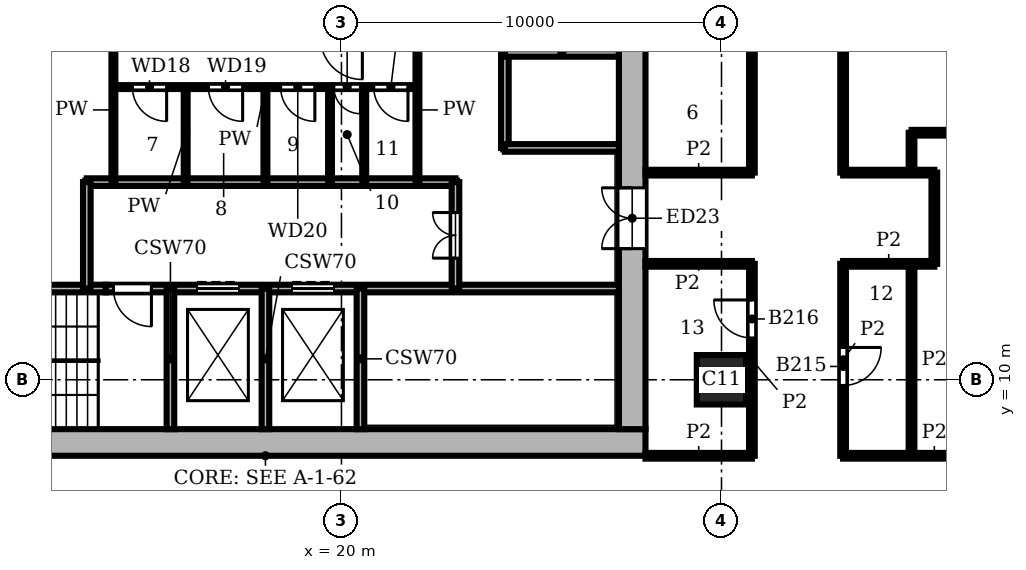
"""IFC4 building model, lengths in metres.
Left out: names, types, materials, properties, quantities, classifications, styles, units other than length and angle.
Written with IfcOpenShell. Run it as: python <this file> out.ifc"""

import sys

from ifc_helpers import new_model, si_unit, direction, frame, frame_2d, origin, origin_2d, place, context, subcontext, project, spatial, rectangle, extrude, element, fill, save


model = new_model("IFC4")
c1 = context("Model", 3, precision=1e-05, world=origin(), true_north=direction((0.0, 1.0)))
c2 = subcontext(c1, "Body", "Model", "MODEL_VIEW")
j1 = project(units=[si_unit("LENGTHUNIT", "METRE"), si_unit("PLANEANGLEUNIT", "RADIAN")], contexts=[c1])
p1 = place(None, origin())
s1 = spatial("IfcSite", under=j1, at=p1, CompositionType="ELEMENT")
p2 = place(p1, origin())
s2 = spatial("IfcBuilding", under=s1, at=p2, CompositionType="ELEMENT")
p3 = place(p2, frame((0.0, 0.0, 143.4)))
s3 = spatial("IfcBuildingStorey", under=s2, at=p3, CompositionType="ELEMENT", Elevation=143.4)
p4 = place(p3, frame((30.0, 10.0, 0.0), z_axis=(0.0, 0.0, 1.0), x_axis=(1.0, 0.0, 0.0)))
e1 = element("IfcColumn", 1, at=p4, inside=s3, PredefinedType="COLUMN", context=c2, shape_type="SweptSolid", body=[
    extrude(rectangle(XDim=1.3, YDim=1.3, at=origin_2d()), origin(), (0.0, 0.0, 1.0), 3.9),
])
p5 = place(p3, frame((8.0, 8.35, 0.0), z_axis=(0.0, 0.0, 1.0), x_axis=(1.0, 0.0, 0.0)))
e2 = element("IfcWall", 2, at=p5, inside=s3, PredefinedType="SHEAR", context=c2, shape_type="SweptSolid", body=[
    extrude(rectangle(XDim=20.0, YDim=0.7, at=frame_2d((10.0, 0.0))), origin(), (0.0, 0.0, 1.0), 3.9),
])
p6 = place(p3, frame((27.65, 8.7, 0.0), z_axis=(0.0, 0.0, 1.0), x_axis=(0.0, 1.0, 0.0)))
e3 = element("IfcWall", 3, at=p6, inside=s3, PredefinedType="SHEAR", context=c2, shape_type="SweptSolid", body=[
    extrude(rectangle(XDim=18.6, YDim=0.7, at=frame_2d((9.3, 0.0))), origin(), (0.0, 0.0, 1.0), 3.9),
])
p7 = place(p6, frame((4.75, 0.0, 0.0)))
e4 = element("IfcOpeningElement", 4, at=p7, cuts=e3, PredefinedType="OPENING", context=c2, shape_type="SweptSolid", body=[
    extrude(rectangle(XDim=1.6, YDim=2.1, at=frame_2d((0.8, 1.05))), frame((0.0, 0.36, 0.0), z_axis=(0.0, -1.0, 0.0), x_axis=(1.0, 0.0, 0.0)), (0.0, 0.0, 1.0), 0.72),
])
p8 = place(p3, frame((8.7, 12.4, 0.0), z_axis=(0.0, 0.0, 1.0), x_axis=(1.0, 0.0, 0.0)))
e5 = element("IfcWall", 5, at=p8, inside=s3, PredefinedType="SHEAR", context=c2, shape_type="SweptSolid", body=[
    extrude(rectangle(XDim=5.1, YDim=0.2, at=frame_2d((2.55, 0.0))), origin(), (0.0, 0.0, 1.0), 3.58),
])
p9 = place(p3, frame((13.8, 12.4, 0.0), z_axis=(0.0, 0.0, 1.0), x_axis=(1.0, 0.0, 0.0)))
e6 = element("IfcWall", 6, at=p9, inside=s3, PredefinedType="SHEAR", context=c2, shape_type="SweptSolid", body=[
    extrude(rectangle(XDim=13.5, YDim=0.2, at=frame_2d((6.75, 0.0))), origin(), (0.0, 0.0, 1.0), 3.58),
])
p10 = place(p9, frame((2.4, 0.0, 0.0)))
e7 = element("IfcOpeningElement", 7, at=p10, cuts=e6, PredefinedType="OPENING", context=c2, shape_type="SweptSolid", body=[
    extrude(rectangle(XDim=1.1, YDim=2.1, at=frame_2d((0.55, 1.05))), frame((0.0, 0.11, 0.0), z_axis=(0.0, -1.0, 0.0), x_axis=(1.0, 0.0, 0.0)), (0.0, 0.0, 1.0), 0.22),
])
p11 = place(p9, frame((4.9, 0.0, 0.0)))
e8 = element("IfcOpeningElement", 8, at=p11, cuts=e6, PredefinedType="OPENING", context=c2, shape_type="SweptSolid", body=[
    extrude(rectangle(XDim=1.1, YDim=2.1, at=frame_2d((0.55, 1.05))), frame((0.0, 0.11, 0.0), z_axis=(0.0, -1.0, 0.0), x_axis=(1.0, 0.0, 0.0)), (0.0, 0.0, 1.0), 0.22),
])
p12 = place(p9, frame((0.2, 0.0, 0.0)))
e9 = element("IfcOpeningElement", 9, at=p12, cuts=e6, PredefinedType="OPENING", context=c2, shape_type="SweptSolid", body=[
    extrude(rectangle(XDim=1.0, YDim=2.1, at=frame_2d((0.5, 1.05))), frame((0.0, 0.11, 0.0), z_axis=(0.0, -1.0, 0.0), x_axis=(1.0, 0.0, 0.0)), (0.0, 0.0, 1.0), 0.22),
])
p13 = place(p3, frame((13.3, 15.2, 0.0), z_axis=(0.0, 0.0, 1.0), x_axis=(1.0, 0.0, 0.0)))
e10 = element("IfcWall", 10, at=p13, inside=s3, PredefinedType="SHEAR", context=c2, shape_type="SweptSolid", body=[
    extrude(rectangle(XDim=9.7, YDim=0.2, at=frame_2d((4.85, 0.0))), origin(), (0.0, 0.0, 1.0), 3.58),
])
p14 = place(p3, frame((24.3, 16.1, 0.0), z_axis=(0.0, 0.0, 1.0), x_axis=(1.0, 0.0, 0.0)))
e11 = element("IfcWall", 11, at=p14, inside=s3, PredefinedType="SHEAR", context=c2, shape_type="SweptSolid", body=[
    extrude(rectangle(XDim=3.0, YDim=0.2, at=frame_2d((1.5, 0.0))), origin(), (0.0, 0.0, 1.0), 3.58),
])
p15 = place(p3, frame((14.0, 17.7, 0.0), z_axis=(0.0, 0.0, 1.0), x_axis=(1.0, 0.0, 0.0)))
e12 = element("IfcWall", 12, at=p15, inside=s3, PredefinedType="PARTITIONING", context=c2, shape_type="SweptSolid", body=[
    extrude(rectangle(XDim=8.0, YDim=0.1, at=frame_2d((4.0, 0.0))), origin(), (0.0, 0.0, 1.0), 3.58),
])
p16 = place(p15, frame((0.5, 0.0, 0.0)))
e13 = element("IfcOpeningElement", 13, at=p16, cuts=e12, PredefinedType="OPENING", context=c2, shape_type="SweptSolid", body=[
    extrude(rectangle(XDim=0.9, YDim=2.1, at=frame_2d((0.45, 1.05))), frame((0.0, 0.06, 0.0), z_axis=(0.0, -1.0, 0.0), x_axis=(1.0, 0.0, 0.0)), (0.0, 0.0, 1.0), 0.12),
])
p17 = place(p15, frame((2.5, 0.0, 0.0)))
e14 = element("IfcOpeningElement", 14, at=p17, cuts=e12, PredefinedType="OPENING", context=c2, shape_type="SweptSolid", body=[
    extrude(rectangle(XDim=0.9, YDim=2.1, at=frame_2d((0.45, 1.05))), frame((0.0, 0.06, 0.0), z_axis=(0.0, -1.0, 0.0), x_axis=(1.0, 0.0, 0.0)), (0.0, 0.0, 1.0), 0.12),
])
p18 = place(p15, frame((4.4, 0.0, 0.0)))
e15 = element("IfcOpeningElement", 15, at=p18, cuts=e12, PredefinedType="OPENING", context=c2, shape_type="SweptSolid", body=[
    extrude(rectangle(XDim=0.9, YDim=2.1, at=frame_2d((0.45, 1.05))), frame((0.0, 0.06, 0.0), z_axis=(0.0, -1.0, 0.0), x_axis=(1.0, 0.0, 0.0)), (0.0, 0.0, 1.0), 0.12),
])
p19 = place(p15, frame((5.8, 0.0, 0.0)))
e16 = element("IfcOpeningElement", 16, at=p19, cuts=e12, PredefinedType="OPENING", context=c2, shape_type="SweptSolid", body=[
    extrude(rectangle(XDim=0.7, YDim=2.1, at=frame_2d((0.35, 1.05))), frame((0.0, 0.06, 0.0), z_axis=(0.0, -1.0, 0.0), x_axis=(1.0, 0.0, 0.0)), (0.0, 0.0, 1.0), 0.12),
])
p20 = place(p15, frame((6.85, 0.0, 0.0)))
e17 = element("IfcOpeningElement", 17, at=p20, cuts=e12, PredefinedType="OPENING", context=c2, shape_type="SweptSolid", body=[
    extrude(rectangle(XDim=0.9, YDim=2.1, at=frame_2d((0.45, 1.05))), frame((0.0, 0.06, 0.0), z_axis=(0.0, -1.0, 0.0), x_axis=(1.0, 0.0, 0.0)), (0.0, 0.0, 1.0), 0.12),
])
p21 = place(p3, frame((24.3, 18.6, 0.0), z_axis=(0.0, 0.0, 1.0), x_axis=(1.0, 0.0, 0.0)))
e18 = element("IfcWall", 18, at=p21, inside=s3, PredefinedType="SHEAR", context=c2, shape_type="SweptSolid", body=[
    extrude(rectangle(XDim=3.0, YDim=0.2, at=frame_2d((1.5, 0.0))), origin(), (0.0, 0.0, 1.0), 3.58),
])
p22 = place(p3, frame((13.3, 12.4, 0.0), z_axis=(0.0, 0.0, 1.0), x_axis=(0.0, 1.0, 0.0)))
e19 = element("IfcWall", 19, at=p22, inside=s3, PredefinedType="SHEAR", context=c2, shape_type="SweptSolid", body=[
    extrude(rectangle(XDim=2.8, YDim=0.2, at=frame_2d((1.4, 0.0))), origin(), (0.0, 0.0, 1.0), 3.58),
])
p23 = place(p3, frame((14.0, 15.2, 0.0), z_axis=(0.0, 0.0, 1.0), x_axis=(0.0, 1.0, 0.0)))
e20 = element("IfcWall", 20, at=p23, inside=s3, PredefinedType="PARTITIONING", context=c2, shape_type="SweptSolid", body=[
    extrude(rectangle(XDim=3.8, YDim=0.1, at=frame_2d((1.9, 0.0))), origin(), (0.0, 0.0, 1.0), 3.58),
])
p24 = place(p3, frame((15.5, 8.7, 0.0), z_axis=(0.0, 0.0, 1.0), x_axis=(0.0, 1.0, 0.0)))
e21 = element("IfcWall", 21, at=p24, inside=s3, PredefinedType="SHEAR", context=c2, shape_type="SweptSolid", body=[
    extrude(rectangle(XDim=3.7, YDim=0.2, at=frame_2d((1.85, 0.0))), origin(), (0.0, 0.0, 1.0), 3.58),
])
for number, where, z_axis, x_axis in (
    (22, (15.9, 15.2, 0.0), (0.0, 0.0, 1.0), (0.0, 1.0, 0.0)),
    (23, (18.0, 15.2, 0.0), (0.0, 0.0, 1.0), (0.0, 1.0, 0.0)),
):
    element("IfcWall", number, at=place(p3, frame(where, z_axis=z_axis, x_axis=x_axis)), inside=s3, PredefinedType="PARTITIONING", context=c2, shape_type="SweptSolid", body=[
        extrude(rectangle(XDim=2.5, YDim=0.1, at=frame_2d((1.25, 0.0))), origin(), (0.0, 0.0, 1.0), 3.58),
    ])
p25 = place(p3, frame((18.0, 8.7, 0.0), z_axis=(0.0, 0.0, 1.0), x_axis=(0.0, 1.0, 0.0)))
e24 = element("IfcWall", 24, at=p25, inside=s3, PredefinedType="SHEAR", context=c2, shape_type="SweptSolid", body=[
    extrude(rectangle(XDim=3.7, YDim=0.2, at=frame_2d((1.85, 0.0))), origin(), (0.0, 0.0, 1.0), 3.58),
])
p26 = place(p3, frame((19.7, 15.2, 0.0), z_axis=(0.0, 0.0, 1.0), x_axis=(0.0, 1.0, 0.0)))
e25 = element("IfcWall", 25, at=p26, inside=s3, PredefinedType="PARTITIONING", context=c2, shape_type="SweptSolid", body=[
    extrude(rectangle(XDim=2.5, YDim=0.1, at=frame_2d((1.25, 0.0))), origin(), (0.0, 0.0, 1.0), 3.58),
])
p27 = place(p3, frame((20.5, 8.7, 0.0), z_axis=(0.0, 0.0, 1.0), x_axis=(0.0, 1.0, 0.0)))
e26 = element("IfcWall", 26, at=p27, inside=s3, PredefinedType="SHEAR", context=c2, shape_type="SweptSolid", body=[
    extrude(rectangle(XDim=3.7, YDim=0.2, at=frame_2d((1.85, 0.0))), origin(), (0.0, 0.0, 1.0), 3.58),
])
p28 = place(p3, frame((20.6, 15.2, 0.0), z_axis=(0.0, 0.0, 1.0), x_axis=(0.0, 1.0, 0.0)))
e27 = element("IfcWall", 27, at=p28, inside=s3, PredefinedType="PARTITIONING", context=c2, shape_type="SweptSolid", body=[
    extrude(rectangle(XDim=2.5, YDim=0.1, at=frame_2d((1.25, 0.0))), origin(), (0.0, 0.0, 1.0), 3.58),
])
p29 = place(p3, frame((22.0, 15.2, 0.0), z_axis=(0.0, 0.0, 1.0), x_axis=(0.0, 1.0, 0.0)))
e28 = element("IfcWall", 28, at=p29, inside=s3, PredefinedType="PARTITIONING", context=c2, shape_type="SweptSolid", body=[
    extrude(rectangle(XDim=3.8, YDim=0.1, at=frame_2d((1.9, 0.0))), origin(), (0.0, 0.0, 1.0), 3.58),
])
p30 = place(p3, frame((23.0, 12.4, 0.0), z_axis=(0.0, 0.0, 1.0), x_axis=(0.0, 1.0, 0.0)))
e29 = element("IfcWall", 29, at=p30, inside=s3, PredefinedType="SHEAR", context=c2, shape_type="SweptSolid", body=[
    extrude(rectangle(XDim=2.8, YDim=0.2, at=frame_2d((1.4, 0.0))), origin(), (0.0, 0.0, 1.0), 3.58),
])
p31 = place(p30, frame((0.8, 0.0, 0.0)))
e30 = element("IfcOpeningElement", 30, at=p31, cuts=e29, PredefinedType="OPENING", context=c2, shape_type="SweptSolid", body=[
    extrude(rectangle(XDim=1.2, YDim=2.1, at=frame_2d((0.6, 1.05))), frame((0.0, 0.11, 0.0), z_axis=(0.0, -1.0, 0.0), x_axis=(1.0, 0.0, 0.0)), (0.0, 0.0, 1.0), 0.22),
])
p32 = place(p3, frame((24.3, 16.1, 0.0), z_axis=(0.0, 0.0, 1.0), x_axis=(0.0, 1.0, 0.0)))
e31 = element("IfcWall", 31, at=p32, inside=s3, PredefinedType="SHEAR", context=c2, shape_type="SweptSolid", body=[
    extrude(rectangle(XDim=7.5, YDim=0.2, at=frame_2d((3.75, 0.0))), origin(), (0.0, 0.0, 1.0), 3.58),
])
p33 = place(p32, frame((5.7, 0.0, 0.0)))
e32 = element("IfcOpeningElement", 32, at=p33, cuts=e31, PredefinedType="OPENING", context=c2, shape_type="SweptSolid", body=[
    extrude(rectangle(XDim=1.1, YDim=2.1, at=frame_2d((0.55, 1.05))), frame((0.0, 0.11, 0.0), z_axis=(0.0, -1.0, 0.0), x_axis=(1.0, 0.0, 0.0)), (0.0, 0.0, 1.0), 0.22),
])
p34 = place(p3, frame((30.8, 8.0, 0.0), z_axis=(0.0, 0.0, 1.0), x_axis=(0.0, 1.0, 0.0)))
e33 = element("IfcWall", 33, at=p34, inside=s3, PredefinedType="PARTITIONING", context=c2, shape_type="SweptSolid", body=[
    extrude(rectangle(XDim=5.05, YDim=0.15, at=frame_2d((2.525, 0.0))), origin(), (0.0, 0.0, 1.0), 3.58),
])
p35 = place(p34, frame((3.1, 0.0, 0.0)))
e34 = element("IfcOpeningElement", 34, at=p35, cuts=e33, PredefinedType="OPENING", context=c2, shape_type="SweptSolid", body=[
    extrude(rectangle(XDim=1.0, YDim=2.1, at=frame_2d((0.5, 1.05))), frame((0.0, 0.085, 0.0), z_axis=(0.0, -1.0, 0.0), x_axis=(1.0, 0.0, 0.0)), (0.0, 0.0, 1.0), 0.17),
])
p36 = place(p3, frame((30.8, 15.451, 0.0), z_axis=(0.0, 0.0, 1.0), x_axis=(0.0, 1.0, 0.0)))
e35 = element("IfcWall", 35, at=p36, inside=s3, PredefinedType="PARTITIONING", context=c2, shape_type="SweptSolid", body=[
    extrude(rectangle(XDim=10.548, YDim=0.15, at=frame_2d((5.274, 0.0))), origin(), (0.0, 0.0, 1.0), 3.58),
])
p37 = place(p36, frame((6.85, 0.0, 0.0)))
e36 = element("IfcOpeningElement", 36, at=p37, cuts=e35, PredefinedType="OPENING", context=c2, shape_type="SweptSolid", body=[
    extrude(rectangle(XDim=1.0, YDim=2.1, at=frame_2d((0.5, 1.05))), frame((0.0, 0.085, 0.0), z_axis=(0.0, -1.0, 0.0), x_axis=(1.0, 0.0, 0.0)), (0.0, 0.0, 1.0), 0.17),
])
p38 = place(p3, frame((33.2, 8.0, 0.0), z_axis=(0.0, 0.0, 1.0), x_axis=(0.0, 1.0, 0.0)))
e37 = element("IfcWall", 37, at=p38, inside=s3, PredefinedType="PARTITIONING", context=c2, shape_type="SweptSolid", body=[
    extrude(rectangle(XDim=5.05, YDim=0.15, at=frame_2d((2.525, 0.0))), origin(), (0.0, 0.0, 1.0), 3.58),
])
p39 = place(p38, frame((1.85, 0.0, 0.0)))
e38 = element("IfcOpeningElement", 38, at=p39, cuts=e37, PredefinedType="OPENING", context=c2, shape_type="SweptSolid", body=[
    extrude(rectangle(XDim=1.0, YDim=2.1, at=frame_2d((0.5, 1.05))), frame((0.0, 0.085, 0.0), z_axis=(0.0, -1.0, 0.0), x_axis=(1.0, 0.0, 0.0)), (0.0, 0.0, 1.0), 0.17),
])
p40 = place(p3, frame((33.2, 15.451, 0.0), z_axis=(0.0, 0.0, 1.0), x_axis=(0.0, 1.0, 0.0)))
e39 = element("IfcWall", 39, at=p40, inside=s3, PredefinedType="PARTITIONING", context=c2, shape_type="SweptSolid", body=[
    extrude(rectangle(XDim=10.548, YDim=0.15, at=frame_2d((5.274, 0.0))), origin(), (0.0, 0.0, 1.0), 3.58),
])
p41 = place(p40, frame((4.85, 0.0, 0.0)))
e40 = element("IfcOpeningElement", 40, at=p41, cuts=e39, PredefinedType="OPENING", context=c2, shape_type="SweptSolid", body=[
    extrude(rectangle(XDim=1.0, YDim=2.1, at=frame_2d((0.5, 1.05))), frame((0.0, 0.085, 0.0), z_axis=(0.0, -1.0, 0.0), x_axis=(1.0, 0.0, 0.0)), (0.0, 0.0, 1.0), 0.17),
])
p42 = place(p3, frame((35.0, 8.0, 0.0), z_axis=(0.0, 0.0, 1.0), x_axis=(0.0, 1.0, 0.0)))
e41 = element("IfcWall", 41, at=p42, inside=s3, PredefinedType="PARTITIONING", context=c2, shape_type="SweptSolid", body=[
    extrude(rectangle(XDim=5.05, YDim=0.15, at=frame_2d((2.525, 0.0))), origin(), (0.0, 0.0, 1.0), 3.58),
])
p43 = place(p3, frame((35.0, 15.451, 0.0), z_axis=(0.0, 0.0, 1.0), x_axis=(0.0, 1.0, 0.0)))
e42 = element("IfcWall", 42, at=p43, inside=s3, PredefinedType="PARTITIONING", context=c2, shape_type="SweptSolid", body=[
    extrude(rectangle(XDim=1.047, YDim=0.15, at=frame_2d((0.523, 0.0))), origin(), (0.0, 0.0, 1.0), 3.58),
])
p44 = place(p3, frame((35.6, 13.05, 0.0), z_axis=(0.0, 0.0, 1.0), x_axis=(0.0, 1.0, 0.0)))
e43 = element("IfcWall", 43, at=p44, inside=s3, PredefinedType="PARTITIONING", context=c2, shape_type="SweptSolid", body=[
    extrude(rectangle(XDim=2.4, YDim=0.15, at=frame_2d((1.2, 0.0))), origin(), (0.0, 0.0, 1.0), 3.58),
])
p45 = place(p3, frame((28.0, 8.0, 0.0), z_axis=(0.0, 0.0, 1.0), x_axis=(1.0, 0.0, 0.0)))
e44 = element("IfcWall", 44, at=p45, inside=s3, PredefinedType="PARTITIONING", context=c2, shape_type="SweptSolid", body=[
    extrude(rectangle(XDim=2.8, YDim=0.15, at=frame_2d((1.4, 0.0))), origin(), (0.0, 0.0, 1.0), 3.58),
])
p46 = place(p3, frame((33.2, 8.0, 0.0), z_axis=(0.0, 0.0, 1.0), x_axis=(1.0, 0.0, 0.0)))
e45 = element("IfcWall", 45, at=p46, inside=s3, PredefinedType="PARTITIONING", context=c2, shape_type="SweptSolid", body=[
    extrude(rectangle(XDim=4.8, YDim=0.15, at=frame_2d((2.4, 0.0))), origin(), (0.0, 0.0, 1.0), 3.58),
])
p47 = place(p3, frame((28.0, 13.05, 0.0), z_axis=(0.0, 0.0, 1.0), x_axis=(1.0, 0.0, 0.0)))
e46 = element("IfcWall", 46, at=p47, inside=s3, PredefinedType="PARTITIONING", context=c2, shape_type="SweptSolid", body=[
    extrude(rectangle(XDim=2.8, YDim=0.15, at=frame_2d((1.4, 0.0))), origin(), (0.0, 0.0, 1.0), 3.58),
])
p48 = place(p3, frame((33.2, 13.05, 0.0), z_axis=(0.0, 0.0, 1.0), x_axis=(1.0, 0.0, 0.0)))
e47 = element("IfcWall", 47, at=p48, inside=s3, PredefinedType="PARTITIONING", context=c2, shape_type="SweptSolid", body=[
    extrude(rectangle(XDim=2.4, YDim=0.15, at=frame_2d((1.2, 0.0))), origin(), (0.0, 0.0, 1.0), 3.58),
])
p49 = place(p3, frame((28.0, 15.45, 0.0), z_axis=(0.0, 0.0, 1.0), x_axis=(1.0, 0.0, 0.0)))
e48 = element("IfcWall", 48, at=p49, inside=s3, PredefinedType="PARTITIONING", context=c2, shape_type="SweptSolid", body=[
    extrude(rectangle(XDim=2.799, YDim=0.15, at=frame_2d((1.399, 0.0))), origin(), (0.0, 0.0, 1.0), 3.58),
])
p50 = place(p3, frame((33.201, 15.45, 0.0), z_axis=(0.0, 0.0, 1.0), x_axis=(1.0, 0.0, 0.0)))
e49 = element("IfcWall", 49, at=p50, inside=s3, PredefinedType="PARTITIONING", context=c2, shape_type="SweptSolid", body=[
    extrude(rectangle(XDim=2.399, YDim=0.15, at=frame_2d((1.2, 0.0))), origin(), (0.0, 0.0, 1.0), 3.58),
])
p51 = place(p3, frame((35.002, 16.5, 0.0), z_axis=(0.0, 0.0, 1.0), x_axis=(1.0, 0.0, 0.0)))
e50 = element("IfcWall", 50, at=p51, inside=s3, PredefinedType="PARTITIONING", context=c2, shape_type="SweptSolid", body=[
    extrude(rectangle(XDim=19.998, YDim=0.15, at=frame_2d((9.999, 0.0))), origin(), (0.0, 0.0, 1.0), 3.58),
])
p52 = place(p10, origin())
e51 = element("IfcDoor", 51, at=p52, inside=s3, OperationType="DOUBLE_DOOR_SLIDING", PredefinedType="DOOR", context=c2, shape_type="SweptSolid", body=[
    extrude(rectangle(XDim=1.1, YDim=2.1, at=frame_2d((0.55, 1.05))), frame((0.0, 0.025, 0.0), z_axis=(0.0, -1.0, 0.0), x_axis=(1.0, 0.0, 0.0)), (0.0, 0.0, 1.0), 0.05),
])
fill(e7, e51)
p53 = place(p11, origin())
e52 = element("IfcDoor", 52, at=p53, inside=s3, OperationType="DOUBLE_DOOR_SLIDING", PredefinedType="DOOR", context=c2, shape_type="SweptSolid", body=[
    extrude(rectangle(XDim=1.1, YDim=2.1, at=frame_2d((0.55, 1.05))), frame((0.0, 0.025, 0.0), z_axis=(0.0, -1.0, 0.0), x_axis=(1.0, 0.0, 0.0)), (0.0, 0.0, 1.0), 0.05),
])
fill(e8, e52)
p54 = place(p12, frame((1.0, 0.0, 0.0), z_axis=(0.0, 0.0, 1.0), x_axis=(-1.0, 0.0, 0.0)))
e53 = element("IfcDoor", 53, at=p54, inside=s3, OperationType="SINGLE_SWING_LEFT", PredefinedType="DOOR", context=c2, shape_type="SweptSolid", body=[
    extrude(rectangle(XDim=1.0, YDim=2.1, at=frame_2d((0.5, 1.05))), frame((0.0, 0.025, 0.0), z_axis=(0.0, -1.0, 0.0), x_axis=(1.0, 0.0, 0.0)), (0.0, 0.0, 1.0), 0.05),
])
fill(e9, e53)
p55 = place(p31, origin())
e54 = element("IfcDoor", 54, at=p55, inside=s3, OperationType="DOUBLE_DOOR_SINGLE_SWING", PredefinedType="DOOR", context=c2, shape_type="SweptSolid", body=[
    extrude(rectangle(XDim=1.2, YDim=2.1, at=frame_2d((0.6, 1.05))), frame((0.0, 0.025, 0.0), z_axis=(0.0, -1.0, 0.0), x_axis=(1.0, 0.0, 0.0)), (0.0, 0.0, 1.0), 0.05),
])
fill(e30, e54)
p56 = place(p16, frame((0.9, 0.0, 0.0), z_axis=(0.0, 0.0, 1.0), x_axis=(-1.0, 0.0, 0.0)))
e55 = element("IfcDoor", 55, at=p56, inside=s3, OperationType="SINGLE_SWING_LEFT", PredefinedType="DOOR", context=c2, shape_type="SweptSolid", body=[
    extrude(rectangle(XDim=0.9, YDim=2.1, at=frame_2d((0.45, 1.05))), frame((0.0, 0.025, 0.0), z_axis=(0.0, -1.0, 0.0), x_axis=(1.0, 0.0, 0.0)), (0.0, 0.0, 1.0), 0.05),
])
fill(e13, e55)
p57 = place(p17, frame((0.9, 0.0, 0.0), z_axis=(0.0, 0.0, 1.0), x_axis=(-1.0, 0.0, 0.0)))
e56 = element("IfcDoor", 56, at=p57, inside=s3, OperationType="SINGLE_SWING_LEFT", PredefinedType="DOOR", context=c2, shape_type="SweptSolid", body=[
    extrude(rectangle(XDim=0.9, YDim=2.1, at=frame_2d((0.45, 1.05))), frame((0.0, 0.025, 0.0), z_axis=(0.0, -1.0, 0.0), x_axis=(1.0, 0.0, 0.0)), (0.0, 0.0, 1.0), 0.05),
])
fill(e14, e56)
p58 = place(p18, frame((0.9, 0.0, 0.0), z_axis=(0.0, 0.0, 1.0), x_axis=(-1.0, 0.0, 0.0)))
e57 = element("IfcDoor", 57, at=p58, inside=s3, OperationType="SINGLE_SWING_LEFT", PredefinedType="DOOR", context=c2, shape_type="SweptSolid", body=[
    extrude(rectangle(XDim=0.9, YDim=2.1, at=frame_2d((0.45, 1.05))), frame((0.0, 0.025, 0.0), z_axis=(0.0, -1.0, 0.0), x_axis=(1.0, 0.0, 0.0)), (0.0, 0.0, 1.0), 0.05),
])
fill(e15, e57)
p59 = place(p19, frame((0.7, 0.0, 0.0), z_axis=(0.0, 0.0, 1.0), x_axis=(-1.0, 0.0, 0.0)))
e58 = element("IfcDoor", 58, at=p59, inside=s3, OperationType="SINGLE_SWING_LEFT", PredefinedType="DOOR", context=c2, shape_type="SweptSolid", body=[
    extrude(rectangle(XDim=0.7, YDim=2.1, at=frame_2d((0.35, 1.05))), frame((0.0, 0.025, 0.0), z_axis=(0.0, -1.0, 0.0), x_axis=(1.0, 0.0, 0.0)), (0.0, 0.0, 1.0), 0.05),
])
fill(e16, e58)
p60 = place(p20, frame((0.9, 0.0, 0.0), z_axis=(0.0, 0.0, 1.0), x_axis=(-1.0, 0.0, 0.0)))
e59 = element("IfcDoor", 59, at=p60, inside=s3, OperationType="SINGLE_SWING_LEFT", PredefinedType="DOOR", context=c2, shape_type="SweptSolid", body=[
    extrude(rectangle(XDim=0.9, YDim=2.1, at=frame_2d((0.45, 1.05))), frame((0.0, 0.025, 0.0), z_axis=(0.0, -1.0, 0.0), x_axis=(1.0, 0.0, 0.0)), (0.0, 0.0, 1.0), 0.05),
])
fill(e17, e59)
p61 = place(p7, origin())
e60 = element("IfcDoor", 60, at=p61, inside=s3, OperationType="DOUBLE_DOOR_SINGLE_SWING", PredefinedType="DOOR", context=c2, shape_type="SweptSolid", body=[
    extrude(rectangle(XDim=1.6, YDim=2.1, at=frame_2d((0.8, 1.05))), frame((0.0, 0.025, 0.0), z_axis=(0.0, -1.0, 0.0), x_axis=(1.0, 0.0, 0.0)), (0.0, 0.0, 1.0), 0.05),
])
fill(e4, e60)
p62 = place(p39, frame((1.0, 0.0, 0.0), z_axis=(0.0, 0.0, 1.0), x_axis=(-1.0, 0.0, 0.0)))
e61 = element("IfcDoor", 61, at=p62, inside=s3, OperationType="SINGLE_SWING_LEFT", PredefinedType="DOOR", context=c2, shape_type="SweptSolid", body=[
    extrude(rectangle(XDim=1.0, YDim=2.1, at=frame_2d((0.5, 1.05))), frame((0.0, 0.025, 0.0), z_axis=(0.0, -1.0, 0.0), x_axis=(1.0, 0.0, 0.0)), (0.0, 0.0, 1.0), 0.05),
])
fill(e38, e61)
p63 = place(p35, origin())
e62 = element("IfcDoor", 62, at=p63, inside=s3, OperationType="SINGLE_SWING_RIGHT", PredefinedType="DOOR", context=c2, shape_type="SweptSolid", body=[
    extrude(rectangle(XDim=1.0, YDim=2.1, at=frame_2d((0.5, 1.05))), frame((0.0, 0.025, 0.0), z_axis=(0.0, -1.0, 0.0), x_axis=(1.0, 0.0, 0.0)), (0.0, 0.0, 1.0), 0.05),
])
fill(e34, e62)
save(model, sys.argv[1])
